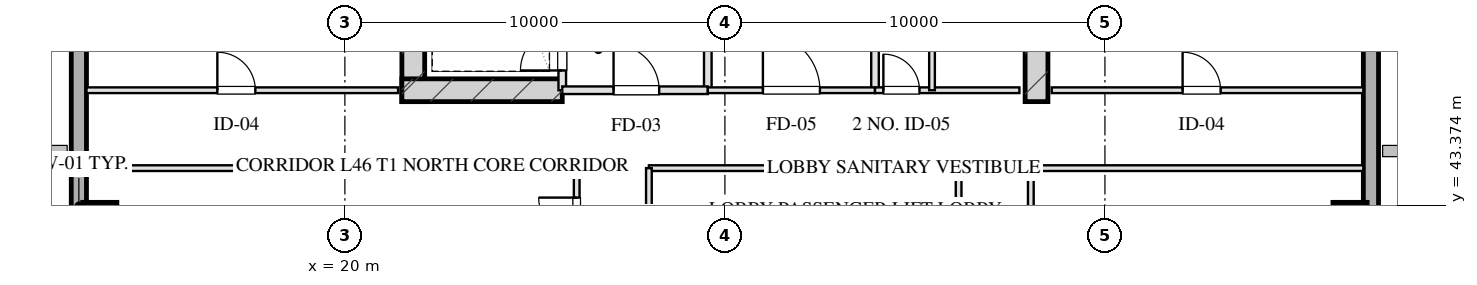
"""IFC4 building model, lengths in metres.
Left out: names, types, materials, properties, quantities, classifications, styles, units other than length and angle.
Written with IfcOpenShell. Run it as: python <this file> out.ifc"""

import sys

from ifc_helpers import new_model, si_unit, direction, frame, frame_2d, origin, origin_2d, place, context, subcontext, project, spatial, rectangle, hollow_rectangle, extrude, element, fill, save


model = new_model("IFC4")
c1 = context("Model", 3, precision=1e-05, world=origin(), true_north=direction((0.0, 1.0)))
c2 = subcontext(c1, "Body", "Model", "MODEL_VIEW")
j1 = project(units=[si_unit("LENGTHUNIT", "METRE"), si_unit("PLANEANGLEUNIT", "RADIAN")], contexts=[c1])
p1 = place(None, origin())
s1 = spatial("IfcSite", under=j1, at=p1, CompositionType="ELEMENT")
p2 = place(p1, origin())
s2 = spatial("IfcBuilding", under=s1, at=p2, CompositionType="ELEMENT")
p3 = place(p2, frame((0.0, 0.0, 173.65)))
s3 = spatial("IfcBuildingStorey", under=s2, at=p3, CompositionType="ELEMENT", Elevation=173.65)
for number, where, z_axis, x_axis in (
    (1, (21.8, 46.1, 0.0), (0.0, 0.0, 1.0), (0.0, 1.0, 0.0)),
    (2, (38.2, 46.1, 0.0), (0.0, 0.0, 1.0), (0.0, 1.0, 0.0)),
):
    element("IfcWall", number, at=place(p3, frame(where, z_axis=z_axis, x_axis=x_axis)), inside=s3, PredefinedType="SHEAR", context=c2, shape_type="SweptSolid", body=[
        extrude(rectangle(XDim=9.48, YDim=0.6, at=frame_2d((4.74, 0.0))), origin(), (0.0, 0.0, 1.0), 3.45),
    ])
p4 = place(p3, frame((21.5, 46.4, 0.0), z_axis=(0.0, 0.0, 1.0), x_axis=(1.0, 0.0, 0.0)))
e3 = element("IfcWall", 3, at=p4, inside=s3, PredefinedType="SHEAR", context=c2, shape_type="SweptSolid", body=[
    extrude(rectangle(XDim=4.22, YDim=0.6, at=frame_2d((2.11, 0.0))), origin(), (0.0, 0.0, 1.0), 3.45),
])
for number, where, z_axis, x_axis in (
    (4, (13.55, 43.0, 0.0), (0.0, 0.0, 1.0), (1.0, 0.0, 0.0)),
    (5, (46.45, 43.0, 0.0), (0.0, 0.0, 1.0), (1.0, 0.0, 0.0)),
):
    element("IfcColumn", number, at=place(p3, frame(where, z_axis=z_axis, x_axis=x_axis)), inside=s3, PredefinedType="COLUMN", context=c2, shape_type="SweptSolid", body=[
        extrude(hollow_rectangle(XDim=0.9, YDim=0.9, WallThickness=0.032, at=origin_2d()), origin(), (0.0, 0.0, 1.0), 3.451),
    ])
p5 = place(p3, frame((13.0, 10.8, 0.0), z_axis=(0.0, 0.0, 1.0), x_axis=(0.0, 1.0, 0.0)))
e6 = element("IfcWall", 6, at=p5, inside=s3, PredefinedType="SOLIDWALL", context=c2, shape_type="SweptSolid", body=[
    extrude(rectangle(XDim=46.4, YDim=0.4, at=frame_2d((23.2, 0.0))), origin(), (0.0, 0.0, 1.0), 2.61),
])
p6 = place(p5, frame((16.85, 0.0, 0.0)))
e7 = element("IfcOpeningElement", 7, at=p6, cuts=e6, PredefinedType="OPENING", context=c2, shape_type="SweptSolid", body=[
    extrude(rectangle(XDim=1.1, YDim=2.15, at=frame_2d((0.55, 1.075))), frame((0.0, 0.21, 0.0), z_axis=(0.0, -1.0, 0.0), x_axis=(1.0, 0.0, 0.0)), (0.0, 0.0, 1.0), 0.42),
])
p7 = place(p3, frame((47.0, 57.2, 0.0), z_axis=(0.0, 0.0, 1.0), x_axis=(0.0, -1.0, 0.0)))
e8 = element("IfcWall", 8, at=p7, inside=s3, PredefinedType="SOLIDWALL", context=c2, shape_type="SweptSolid", body=[
    extrude(rectangle(XDim=46.4, YDim=0.4, at=frame_2d((23.2, 0.0))), origin(), (0.0, 0.0, 1.0), 2.61),
])
p8 = place(p7, frame((19.475, 0.0, 0.75)))
e9 = element("IfcOpeningElement", 9, at=p8, cuts=e8, PredefinedType="OPENING", context=c2, shape_type="SweptSolid", body=[
    extrude(rectangle(XDim=2.25, YDim=1.46, at=frame_2d((1.125, 0.73))), frame((0.0, 0.21, 0.0), z_axis=(0.0, -1.0, 0.0), x_axis=(1.0, 0.0, 0.0)), (0.0, 0.0, 1.0), 0.42),
])
p9 = place(p7, frame((15.675, 0.0, 0.75)))
e10 = element("IfcOpeningElement", 10, at=p9, cuts=e8, PredefinedType="OPENING", context=c2, shape_type="SweptSolid", body=[
    extrude(rectangle(XDim=2.25, YDim=1.46, at=frame_2d((1.125, 0.73))), frame((0.0, 0.21, 0.0), z_axis=(0.0, -1.0, 0.0), x_axis=(1.0, 0.0, 0.0)), (0.0, 0.0, 1.0), 0.42),
])
p10 = place(p7, frame((27.05, 0.0, 0.0)))
e11 = element("IfcOpeningElement", 11, at=p10, cuts=e8, PredefinedType="OPENING", context=c2, shape_type="SweptSolid", body=[
    extrude(rectangle(XDim=1.1, YDim=2.15, at=frame_2d((0.55, 1.075))), frame((0.0, 0.21, 0.0), z_axis=(0.0, -1.0, 0.0), x_axis=(1.0, 0.0, 0.0)), (0.0, 0.0, 1.0), 0.42),
])
p11 = place(p3, frame((25.72, 46.4, 0.0), z_axis=(0.0, 0.0, 1.0), x_axis=(0.0, 1.0, 0.0)))
e12 = element("IfcWall", 12, at=p11, inside=s3, PredefinedType="PARTITIONING", context=c2, shape_type="SweptSolid", body=[
    extrude(rectangle(XDim=1.9, YDim=0.2, at=frame_2d((0.95, 0.0))), origin(), (0.0, 0.0, 1.0), 3.175),
])
p12 = place(p11, frame((0.52, 0.0, 0.0)))
e13 = element("IfcOpeningElement", 13, at=p12, cuts=e12, PredefinedType="OPENING", context=c2, shape_type="SweptSolid", body=[
    extrude(rectangle(XDim=1.1, YDim=2.05, at=frame_2d((0.55, 1.025))), frame((0.0, 0.11, 0.0), z_axis=(0.0, -1.0, 0.0), x_axis=(1.0, 0.0, 0.0)), (0.0, 0.0, 1.0), 0.22),
])
p13 = place(p3, frame((29.55, 46.4, 0.0), z_axis=(0.0, 0.0, 1.0), x_axis=(0.0, 1.0, 0.0)))
e14 = element("IfcWall", 14, at=p13, inside=s3, PredefinedType="PARTITIONING", context=c2, shape_type="SweptSolid", body=[
    extrude(rectangle(XDim=8.43, YDim=0.2, at=frame_2d((4.215, 0.0))), origin(), (0.0, 0.0, 1.0), 3.175),
])
p14 = place(p3, frame((25.72, 46.4, 0.0), z_axis=(0.0, 0.0, 1.0), x_axis=(1.0, 0.0, 0.0)))
e15 = element("IfcWall", 15, at=p14, inside=s3, PredefinedType="PARTITIONING", context=c2, shape_type="SweptSolid", body=[
    extrude(rectangle(XDim=3.83, YDim=0.2, at=frame_2d((1.915, 0.0))), origin(), (0.0, 0.0, 1.0), 3.175),
])
p15 = place(p14, frame((1.35, 0.0, 0.0)))
e16 = element("IfcOpeningElement", 16, at=p15, cuts=e15, PredefinedType="OPENING", context=c2, shape_type="SweptSolid", body=[
    extrude(rectangle(XDim=1.2, YDim=2.05, at=frame_2d((0.6, 1.025))), frame((0.0, 0.11, 0.0), z_axis=(0.0, -1.0, 0.0), x_axis=(1.0, 0.0, 0.0)), (0.0, 0.0, 1.0), 0.22),
])
p16 = place(p3, frame((33.95, 46.4, 0.0), z_axis=(0.0, 0.0, 1.0), x_axis=(0.0, 1.0, 0.0)))
e17 = element("IfcWall", 17, at=p16, inside=s3, PredefinedType="PARTITIONING", context=c2, shape_type="SweptSolid", body=[
    extrude(rectangle(XDim=8.43, YDim=0.2, at=frame_2d((4.215, 0.0))), origin(), (0.0, 0.0, 1.0), 3.175),
])
p17 = place(p3, frame((29.55, 46.4, 0.0), z_axis=(0.0, 0.0, 1.0), x_axis=(1.0, 0.0, 0.0)))
e18 = element("IfcWall", 18, at=p17, inside=s3, PredefinedType="PARTITIONING", context=c2, shape_type="SweptSolid", body=[
    extrude(rectangle(XDim=4.4, YDim=0.15, at=frame_2d((2.2, 0.0))), origin(), (0.0, 0.0, 1.0), 3.175),
])
p18 = place(p17, frame((1.45, 0.0, 0.0)))
e19 = element("IfcOpeningElement", 19, at=p18, cuts=e18, PredefinedType="OPENING", context=c2, shape_type="SweptSolid", body=[
    extrude(rectangle(XDim=1.5, YDim=2.05, at=frame_2d((0.75, 1.025))), frame((0.0, 0.085, 0.0), z_axis=(0.0, -1.0, 0.0), x_axis=(1.0, 0.0, 0.0)), (0.0, 0.0, 1.0), 0.17),
])
p19 = place(p3, frame((33.95, 46.4, 0.0), z_axis=(0.0, 0.0, 1.0), x_axis=(1.0, 0.0, 0.0)))
e20 = element("IfcWall", 20, at=p19, inside=s3, PredefinedType="PARTITIONING", context=c2, shape_type="SweptSolid", body=[
    extrude(rectangle(XDim=3.8, YDim=0.15, at=frame_2d((1.9, 0.0))), origin(), (0.0, 0.0, 1.0), 3.175),
])
p20 = place(p19, frame((0.22, 0.0, 0.0)))
e21 = element("IfcOpeningElement", 21, at=p20, cuts=e20, PredefinedType="OPENING", context=c2, shape_type="SweptSolid", body=[
    extrude(rectangle(XDim=0.95, YDim=2.05, at=frame_2d((0.475, 1.025))), frame((0.0, 0.085, 0.0), z_axis=(0.0, -1.0, 0.0), x_axis=(1.0, 0.0, 0.0)), (0.0, 0.0, 1.0), 0.17),
])
p21 = place(p3, frame((35.45, 46.4, 0.0), z_axis=(0.0, 0.0, 1.0), x_axis=(0.0, 1.0, 0.0)))
e22 = element("IfcWall", 22, at=p21, inside=s3, PredefinedType="PARTITIONING", context=c2, shape_type="SweptSolid", body=[
    extrude(rectangle(XDim=8.43, YDim=0.15, at=frame_2d((4.215, 0.0))), origin(), (0.0, 0.0, 1.0), 2.765),
])
p22 = place(p21, frame((2.55, 0.0, 0.0)))
e23 = element("IfcOpeningElement", 23, at=p22, cuts=e22, PredefinedType="OPENING", context=c2, shape_type="SweptSolid", body=[
    extrude(rectangle(XDim=0.95, YDim=2.05, at=frame_2d((0.475, 1.025))), frame((0.0, 0.085, 0.0), z_axis=(0.0, -1.0, 0.0), x_axis=(1.0, 0.0, 0.0)), (0.0, 0.0, 1.0), 0.17),
])
p23 = place(p21, frame((4.7, 0.0, 0.0)))
e24 = element("IfcOpeningElement", 24, at=p23, cuts=e22, PredefinedType="OPENING", context=c2, shape_type="SweptSolid", body=[
    extrude(rectangle(XDim=0.9, YDim=2.05, at=frame_2d((0.45, 1.025))), frame((0.0, 0.085, 0.0), z_axis=(0.0, -1.0, 0.0), x_axis=(1.0, 0.0, 0.0)), (0.0, 0.0, 1.0), 0.17),
])
p24 = place(p21, frame((6.8, 0.0, 0.0)))
e25 = element("IfcOpeningElement", 25, at=p24, cuts=e22, PredefinedType="OPENING", context=c2, shape_type="SweptSolid", body=[
    extrude(rectangle(XDim=0.9, YDim=2.05, at=frame_2d((0.45, 1.025))), frame((0.0, 0.085, 0.0), z_axis=(0.0, -1.0, 0.0), x_axis=(1.0, 0.0, 0.0)), (0.0, 0.0, 1.0), 0.17),
])
p25 = place(p3, frame((13.2, 46.4, 0.0), z_axis=(0.0, 0.0, 1.0), x_axis=(1.0, 0.0, 0.0)))
e26 = element("IfcWall", 26, at=p25, inside=s3, PredefinedType="PARTITIONING", context=c2, shape_type="SweptSolid", body=[
    extrude(rectangle(XDim=8.2, YDim=0.15, at=frame_2d((4.1, 0.0))), origin(), (0.0, 0.0, 1.0), 3.175),
])
p26 = place(p25, frame((3.444, 0.0, 0.0)))
e27 = element("IfcOpeningElement", 27, at=p26, cuts=e26, PredefinedType="OPENING", context=c2, shape_type="SweptSolid", body=[
    extrude(rectangle(XDim=1.0, YDim=2.05, at=frame_2d((0.5, 1.025))), frame((0.0, 0.085, 0.0), z_axis=(0.0, -1.0, 0.0), x_axis=(1.0, 0.0, 0.0)), (0.0, 0.0, 1.0), 0.17),
])
p27 = place(p3, frame((38.6, 46.4, 0.0), z_axis=(0.0, 0.0, 1.0), x_axis=(1.0, 0.0, 0.0)))
e28 = element("IfcWall", 28, at=p27, inside=s3, PredefinedType="PARTITIONING", context=c2, shape_type="SweptSolid", body=[
    extrude(rectangle(XDim=8.2, YDim=0.15, at=frame_2d((4.1, 0.0))), origin(), (0.0, 0.0, 1.0), 3.175),
])
p28 = place(p27, frame((3.444, 0.0, 0.0)))
e29 = element("IfcOpeningElement", 29, at=p28, cuts=e28, PredefinedType="OPENING", context=c2, shape_type="SweptSolid", body=[
    extrude(rectangle(XDim=1.0, YDim=2.05, at=frame_2d((0.5, 1.025))), frame((0.0, 0.085, 0.0), z_axis=(0.0, -1.0, 0.0), x_axis=(1.0, 0.0, 0.0)), (0.0, 0.0, 1.0), 0.17),
])
p29 = place(p3, frame((13.2, 44.35, 0.0), z_axis=(0.0, 0.0, 1.0), x_axis=(1.0, 0.0, 0.0)))
e30 = element("IfcWall", 30, at=p29, inside=s3, PredefinedType="PARTITIONING", context=c2, shape_type="SweptSolid", body=[
    extrude(rectangle(XDim=12.9, YDim=0.15, at=frame_2d((6.45, 0.0))), origin(), (0.0, 0.0, 1.0), 3.175),
])
p30 = place(p3, frame((28.0, 44.35, 0.0), z_axis=(0.0, 0.0, 1.0), x_axis=(1.0, 0.0, 0.0)))
e31 = element("IfcWall", 31, at=p30, inside=s3, PredefinedType="PARTITIONING", context=c2, shape_type="SweptSolid", body=[
    extrude(rectangle(XDim=8.15, YDim=0.15, at=frame_2d((4.075, 0.0))), origin(), (0.0, 0.0, 1.0), 3.175),
])
p31 = place(p3, frame((38.05, 44.35, 0.0), z_axis=(0.0, 0.0, 1.0), x_axis=(1.0, 0.0, 0.0)))
e32 = element("IfcWall", 32, at=p31, inside=s3, PredefinedType="PARTITIONING", context=c2, shape_type="SweptSolid", body=[
    extrude(rectangle(XDim=8.75, YDim=0.15, at=frame_2d((4.375, 0.0))), origin(), (0.0, 0.0, 1.0), 3.175),
])
p32 = place(p3, frame((26.1, 23.65, 0.0), z_axis=(0.0, 0.0, 1.0), x_axis=(0.0, 1.0, 0.0)))
e33 = element("IfcWall", 33, at=p32, inside=s3, PredefinedType="PARTITIONING", context=c2, shape_type="SweptSolid", body=[
    extrude(rectangle(XDim=20.7, YDim=0.15, at=frame_2d((10.35, 0.0))), origin(), (0.0, 0.0, 1.0), 3.175),
])
p33 = place(p32, frame((0.775, 0.0, 0.0)))
e34 = element("IfcOpeningElement", 34, at=p33, cuts=e33, PredefinedType="OPENING", context=c2, shape_type="SweptSolid", body=[
    extrude(rectangle(XDim=1.0, YDim=2.05, at=frame_2d((0.5, 1.025))), frame((0.0, 0.085, 0.0), z_axis=(0.0, -1.0, 0.0), x_axis=(1.0, 0.0, 0.0)), (0.0, 0.0, 1.0), 0.17),
])
p34 = place(p32, frame((3.95, 0.0, 0.0)))
e35 = element("IfcOpeningElement", 35, at=p34, cuts=e33, PredefinedType="OPENING", context=c2, shape_type="SweptSolid", body=[
    extrude(rectangle(XDim=1.0, YDim=2.05, at=frame_2d((0.5, 1.025))), frame((0.0, 0.085, 0.0), z_axis=(0.0, -1.0, 0.0), x_axis=(1.0, 0.0, 0.0)), (0.0, 0.0, 1.0), 0.17),
])
p35 = place(p32, frame((7.51, 0.0, 0.0)))
e36 = element("IfcOpeningElement", 36, at=p35, cuts=e33, PredefinedType="OPENING", context=c2, shape_type="SweptSolid", body=[
    extrude(rectangle(XDim=1.0, YDim=2.05, at=frame_2d((0.5, 1.025))), frame((0.0, 0.085, 0.0), z_axis=(0.0, -1.0, 0.0), x_axis=(1.0, 0.0, 0.0)), (0.0, 0.0, 1.0), 0.17),
])
p36 = place(p32, frame((11.51, 0.0, 0.0)))
e37 = element("IfcOpeningElement", 37, at=p36, cuts=e33, PredefinedType="OPENING", context=c2, shape_type="SweptSolid", body=[
    extrude(rectangle(XDim=1.0, YDim=2.05, at=frame_2d((0.5, 1.025))), frame((0.0, 0.085, 0.0), z_axis=(0.0, -1.0, 0.0), x_axis=(1.0, 0.0, 0.0)), (0.0, 0.0, 1.0), 0.17),
])
p37 = place(p32, frame((15.75, 0.0, 0.0)))
e38 = element("IfcOpeningElement", 38, at=p37, cuts=e33, PredefinedType="OPENING", context=c2, shape_type="SweptSolid", body=[
    extrude(rectangle(XDim=1.05, YDim=2.05, at=frame_2d((0.525, 1.025))), frame((0.0, 0.085, 0.0), z_axis=(0.0, -1.0, 0.0), x_axis=(1.0, 0.0, 0.0)), (0.0, 0.0, 1.0), 0.17),
])
p38 = place(p32, frame((18.925, 0.0, 0.0)))
e39 = element("IfcOpeningElement", 39, at=p38, cuts=e33, PredefinedType="OPENING", context=c2, shape_type="SweptSolid", body=[
    extrude(rectangle(XDim=1.0, YDim=2.05, at=frame_2d((0.5, 1.025))), frame((0.0, 0.085, 0.0), z_axis=(0.0, -1.0, 0.0), x_axis=(1.0, 0.0, 0.0)), (0.0, 0.0, 1.0), 0.17),
])
p39 = place(p3, frame((28.0, 23.65, 0.0), z_axis=(0.0, 0.0, 1.0), x_axis=(0.0, 1.0, 0.0)))
e40 = element("IfcWall", 40, at=p39, inside=s3, PredefinedType="PARTITIONING", context=c2, shape_type="SweptSolid", body=[
    extrude(rectangle(XDim=20.7, YDim=0.15, at=frame_2d((10.35, 0.0))), origin(), (0.0, 0.0, 1.0), 3.175),
])
p40 = place(p39, frame((2.857, 0.0, 0.0)))
e41 = element("IfcOpeningElement", 41, at=p40, cuts=e40, PredefinedType="OPENING", context=c2, shape_type="SweptSolid", body=[
    extrude(rectangle(XDim=1.1, YDim=2.05, at=frame_2d((0.55, 1.025))), frame((0.0, 0.085, 0.0), z_axis=(0.0, -1.0, 0.0), x_axis=(1.0, 0.0, 0.0)), (0.0, 0.0, 1.0), 0.17),
])
p41 = place(p39, frame((17.208, 0.0, 0.0)))
e42 = element("IfcOpeningElement", 42, at=p41, cuts=e40, PredefinedType="OPENING", context=c2, shape_type="SweptSolid", body=[
    extrude(rectangle(XDim=1.1, YDim=2.05, at=frame_2d((0.55, 1.025))), frame((0.0, 0.085, 0.0), z_axis=(0.0, -1.0, 0.0), x_axis=(1.0, 0.0, 0.0)), (0.0, 0.0, 1.0), 0.17),
])
p42 = place(p3, frame((36.15, 23.65, 0.0), z_axis=(0.0, 0.0, 1.0), x_axis=(0.0, 1.0, 0.0)))
e43 = element("IfcWall", 43, at=p42, inside=s3, PredefinedType="PARTITIONING", context=c2, shape_type="SweptSolid", body=[
    extrude(rectangle(XDim=20.7, YDim=0.15, at=frame_2d((10.35, 0.0))), origin(), (0.0, 0.0, 1.0), 3.175),
])
p43 = place(p42, frame((9.71, 0.0, 0.0)))
e44 = element("IfcOpeningElement", 44, at=p43, cuts=e43, PredefinedType="OPENING", context=c2, shape_type="SweptSolid", body=[
    extrude(rectangle(XDim=1.1, YDim=2.05, at=frame_2d((0.55, 1.025))), frame((0.0, 0.085, 0.0), z_axis=(0.0, -1.0, 0.0), x_axis=(1.0, 0.0, 0.0)), (0.0, 0.0, 1.0), 0.17),
])
p44 = place(p3, frame((38.05, 23.65, 0.0), z_axis=(0.0, 0.0, 1.0), x_axis=(0.0, 1.0, 0.0)))
e45 = element("IfcWall", 45, at=p44, inside=s3, PredefinedType="PARTITIONING", context=c2, shape_type="SweptSolid", body=[
    extrude(rectangle(XDim=20.7, YDim=0.15, at=frame_2d((10.35, 0.0))), origin(), (0.0, 0.0, 1.0), 3.175),
])
p45 = place(p44, frame((4.148, 0.0, 0.0)))
e46 = element("IfcOpeningElement", 46, at=p45, cuts=e45, PredefinedType="OPENING", context=c2, shape_type="SweptSolid", body=[
    extrude(rectangle(XDim=1.0, YDim=2.05, at=frame_2d((0.5, 1.025))), frame((0.0, 0.085, 0.0), z_axis=(0.0, -1.0, 0.0), x_axis=(1.0, 0.0, 0.0)), (0.0, 0.0, 1.0), 0.17),
])
p46 = place(p44, frame((14.499, 0.0, 0.0)))
e47 = element("IfcOpeningElement", 47, at=p46, cuts=e45, PredefinedType="OPENING", context=c2, shape_type="SweptSolid", body=[
    extrude(rectangle(XDim=1.0, YDim=2.05, at=frame_2d((0.5, 1.025))), frame((0.0, 0.085, 0.0), z_axis=(0.0, -1.0, 0.0), x_axis=(1.0, 0.0, 0.0)), (0.0, 0.0, 1.0), 0.17),
])
p47 = place(p12, origin())
e48 = element("IfcDoor", 48, at=p47, inside=s3, OperationType="SINGLE_SWING_LEFT", PredefinedType="DOOR", context=c2, shape_type="SweptSolid", body=[
    extrude(rectangle(XDim=1.1, YDim=2.05, at=frame_2d((0.55, 1.025))), frame((0.0, 0.025, 0.0), z_axis=(0.0, -1.0, 0.0), x_axis=(1.0, 0.0, 0.0)), (0.0, 0.0, 1.0), 0.05),
])
fill(e13, e48)
p48 = place(p15, origin())
e49 = element("IfcDoor", 49, at=p48, inside=s3, OperationType="SINGLE_SWING_LEFT", PredefinedType="DOOR", context=c2, shape_type="SweptSolid", body=[
    extrude(rectangle(XDim=1.2, YDim=2.05, at=frame_2d((0.6, 1.025))), frame((0.0, 0.025, 0.0), z_axis=(0.0, -1.0, 0.0), x_axis=(1.0, 0.0, 0.0)), (0.0, 0.0, 1.0), 0.05),
])
fill(e16, e49)
p49 = place(p18, origin())
e50 = element("IfcDoor", 50, at=p49, inside=s3, OperationType="SINGLE_SWING_LEFT", PredefinedType="DOOR", context=c2, shape_type="SweptSolid", body=[
    extrude(rectangle(XDim=1.5, YDim=2.05, at=frame_2d((0.75, 1.025))), frame((0.0, 0.025, 0.0), z_axis=(0.0, -1.0, 0.0), x_axis=(1.0, 0.0, 0.0)), (0.0, 0.0, 1.0), 0.05),
])
fill(e19, e50)
p50 = place(p20, origin())
e51 = element("IfcDoor", 51, at=p50, inside=s3, OperationType="SINGLE_SWING_LEFT", PredefinedType="DOOR", context=c2, shape_type="SweptSolid", body=[
    extrude(rectangle(XDim=0.95, YDim=2.05, at=frame_2d((0.475, 1.025))), frame((0.0, 0.025, 0.0), z_axis=(0.0, -1.0, 0.0), x_axis=(1.0, 0.0, 0.0)), (0.0, 0.0, 1.0), 0.05),
])
fill(e21, e51)
p51 = place(p26, origin())
e52 = element("IfcDoor", 52, at=p51, inside=s3, OperationType="SINGLE_SWING_LEFT", PredefinedType="DOOR", context=c2, shape_type="SweptSolid", body=[
    extrude(rectangle(XDim=1.0, YDim=2.05, at=frame_2d((0.5, 1.025))), frame((0.0, 0.025, 0.0), z_axis=(0.0, -1.0, 0.0), x_axis=(1.0, 0.0, 0.0)), (0.0, 0.0, 1.0), 0.05),
])
fill(e27, e52)
p52 = place(p28, origin())
e53 = element("IfcDoor", 53, at=p52, inside=s3, OperationType="SINGLE_SWING_LEFT", PredefinedType="DOOR", context=c2, shape_type="SweptSolid", body=[
    extrude(rectangle(XDim=1.0, YDim=2.05, at=frame_2d((0.5, 1.025))), frame((0.0, 0.025, 0.0), z_axis=(0.0, -1.0, 0.0), x_axis=(1.0, 0.0, 0.0)), (0.0, 0.0, 1.0), 0.05),
])
fill(e29, e53)
p53 = place(p38, origin())
e54 = element("IfcDoor", 54, at=p53, inside=s3, OperationType="SINGLE_SWING_RIGHT", PredefinedType="DOOR", context=c2, shape_type="SweptSolid", body=[
    extrude(rectangle(XDim=1.0, YDim=2.05, at=frame_2d((0.5, 1.025))), frame((0.0, 0.025, 0.0), z_axis=(0.0, -1.0, 0.0), x_axis=(1.0, 0.0, 0.0)), (0.0, 0.0, 1.0), 0.05),
])
fill(e39, e54)
save(model, sys.argv[1])
